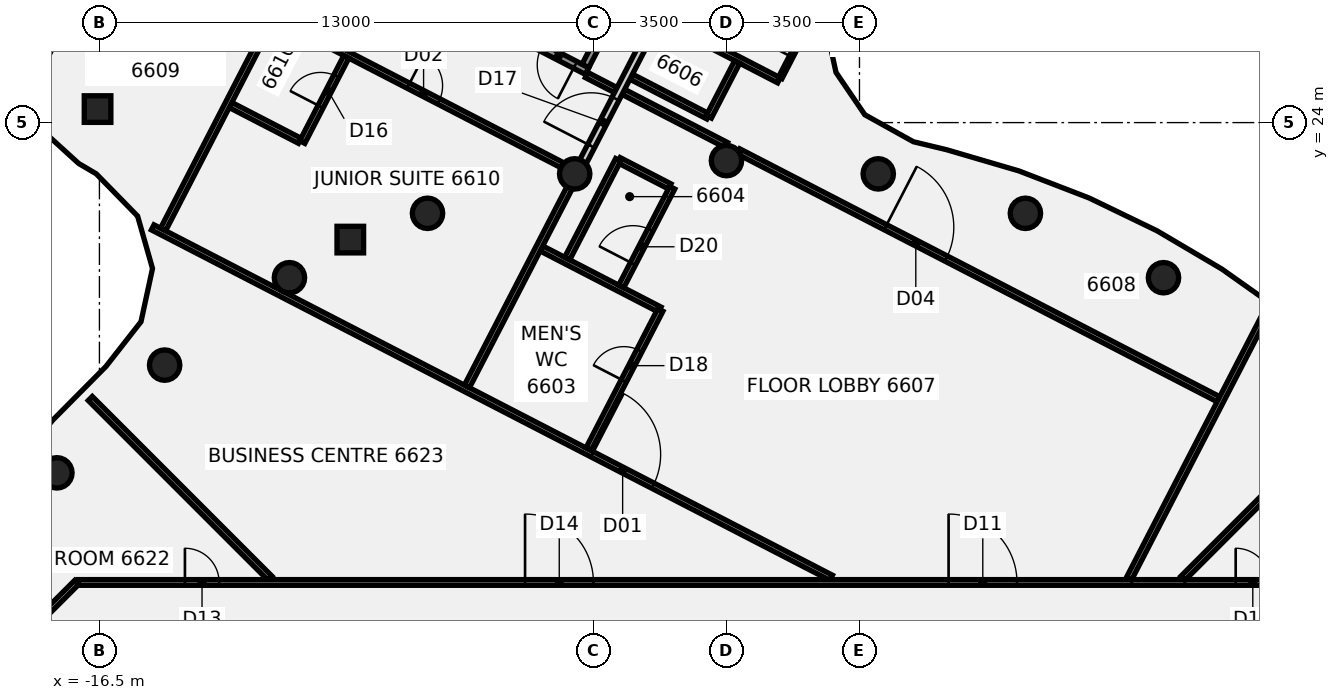
"""IFC4 building model, lengths in metres.
Left out: names, types, materials, properties, quantities, classifications, styles, units other than length and angle.
Written with IfcOpenShell. Run it as: python <this file> out.ifc"""

import sys

from ifc_helpers import new_model, si_unit, direction, frame, frame_2d, origin, origin_2d, place, context, subcontext, project, spatial, rectangle, circle, extrude, element, fill, save


model = new_model("IFC4")
c1 = context("Model", 3, precision=1e-05, world=origin(), true_north=direction((0.0, 1.0)))
c2 = subcontext(c1, "Body", "Model", "MODEL_VIEW")
j1 = project(units=[si_unit("LENGTHUNIT", "METRE"), si_unit("PLANEANGLEUNIT", "RADIAN")], contexts=[c1])
p1 = place(None, origin())
s1 = spatial("IfcSite", under=j1, at=p1, CompositionType="ELEMENT")
p2 = place(p1, origin())
s2 = spatial("IfcBuilding", under=s1, at=p2, CompositionType="ELEMENT")
p3 = place(p2, frame((0.0, 0.0, 260.4)))
s3 = spatial("IfcBuildingStorey", under=s2, at=p3, CompositionType="ELEMENT", Elevation=260.4)
for number, where, z_axis, x_axis in (
    (1, (11.5, 19.919, -0.14), (0.0, 0.0, 1.0), (1.0, 0.0, 0.0)),
    (2, (7.866, 21.613, -0.14), (0.0, 0.0, 1.0), (1.0, 0.0, 0.0)),
    (3, (3.994, 22.651, -0.14), (0.0, 0.0, 1.0), (1.0, 0.0, 0.0)),
    (4, (0.0, 23.0, -0.14), (0.0, 0.0, 1.0), (1.0, 0.0, 0.0)),
    (5, (-3.994, 22.651, -0.14), (0.0, 0.0, 1.0), (1.0, 0.0, 0.0)),
    (6, (-7.866, 21.613, -0.14), (0.0, 0.0, 1.0), (1.0, 0.0, 0.0)),
    (7, (-11.5, 19.919, -0.14), (0.0, 0.0, 1.0), (1.0, 0.0, 0.0)),
    (8, (-14.784, 17.619, -0.14), (0.0, 0.0, 1.0), (1.0, 0.0, 0.0)),
    (9, (-17.619, 14.784, -0.14), (0.0, 0.0, 1.0), (1.0, 0.0, 0.0)),
):
    element("IfcColumn", number, at=place(p3, frame(where, z_axis=z_axis, x_axis=x_axis)), inside=s3, PredefinedType="COLUMN", context=c2, shape_type="SweptSolid", body=[
        extrude(circle(Radius=0.4, at=origin_2d()), origin(), (0.0, 0.0, 1.0), 3.6),
    ])
p4 = place(p3, frame((-9.898, 20.921, -0.139), z_axis=(0.005896416244, -0.050017875725, 0.998730916906), x_axis=(0.459230429043, 0.887336577065, 0.041727832963)))
e10 = element("IfcColumn", 10, at=p4, inside=s3, PredefinedType="COLUMN", context=c2, shape_type="SweptSolid", body=[
    extrude(rectangle(XDim=0.7, YDim=0.7, at=origin_2d()), origin(), (0.0, 0.0, 1.0), 3.602),
])
p5 = place(p3, frame((-16.549, 24.356, -0.138), z_axis=(0.082069355489, -0.128908611525, 0.988254618388), x_axis=(0.462174840487, 0.883451999176, 0.076856892816)))
e11 = element("IfcColumn", 11, at=p5, inside=s3, PredefinedType="COLUMN", context=c2, shape_type="SweptSolid", body=[
    extrude(rectangle(XDim=0.7, YDim=0.7, at=origin_2d()), origin(), (0.0, 0.0, 1.0), 3.638),
])
p6 = place(p3, frame((-16.74, 16.74, 0.0), z_axis=(0.0, 0.0, 1.0), x_axis=(0.707106781187, -0.707106781187, 0.0)))
e12 = element("IfcWall", 12, at=p6, inside=s3, PredefinedType="PARTITIONING", context=c2, shape_type="SweptSolid", body=[
    extrude(rectangle(XDim=6.691, YDim=0.15, at=frame_2d((3.345, 0.0))), origin(), (0.0, 0.0, 1.0), 2.864),
])
p7 = place(p3, frame((-15.098, 21.244, 0.0), z_axis=(0.0, 0.0, 1.0), x_axis=(0.888519040902, -0.458839747575, 0.0)))
e13 = element("IfcWall", 13, at=p7, inside=s3, PredefinedType="PARTITIONING", context=c2, shape_type="SweptSolid", body=[
    extrude(rectangle(XDim=20.094, YDim=0.15, at=frame_2d((10.047, 0.0))), origin(), (0.0, 0.0, 1.0), 2.864),
])
p8 = place(p7, frame((13.018, 0.0, 0.0)))
e14 = element("IfcOpeningElement", 14, at=p8, cuts=e13, PredefinedType="OPENING", context=c2, shape_type="SweptSolid", body=[
    extrude(rectangle(XDim=1.8, YDim=2.1, at=frame_2d((0.9, 1.05))), frame((0.0, 0.085, 0.0), z_axis=(0.0, -1.0, 0.0), x_axis=(1.0, 0.0, 0.0)), (0.0, 0.0, 1.0), 0.17),
])
p9 = place(p3, frame((-13.05, 24.463, 0.0), z_axis=(0.0, 0.0, 1.0), x_axis=(0.888443709426, -0.458985593653, 0.0)))
e15 = element("IfcWall", 15, at=p9, inside=s3, PredefinedType="PARTITIONING", context=c2, shape_type="SweptSolid", body=[
    extrude(rectangle(XDim=2.051, YDim=0.15, at=frame_2d((1.025, 0.0))), origin(), (0.0, 0.0, 1.0), 2.864),
])
p10 = place(p3, frame((-11.857, 26.773, 0.0), z_axis=(0.0, 0.0, 1.0), x_axis=(0.888435104215, -0.459002250102, 0.0)))
e16 = element("IfcWall", 16, at=p10, inside=s3, PredefinedType="PARTITIONING", context=c2, shape_type="SweptSolid", body=[
    extrude(rectangle(XDim=8.479, YDim=0.15, at=frame_2d((4.24, 0.0))), origin(), (0.0, 0.0, 1.0), 2.864),
])
p11 = place(p10, frame((3.926, 0.0, 0.0)))
e17 = element("IfcOpeningElement", 17, at=p11, cuts=e16, PredefinedType="OPENING", context=c2, shape_type="SweptSolid", body=[
    extrude(rectangle(XDim=0.9, YDim=2.1, at=frame_2d((0.45, 1.05))), frame((0.0, 0.085, 0.0), z_axis=(0.0, -1.0, 0.0), x_axis=(1.0, 0.0, 0.0)), (0.0, 0.0, 1.0), 0.17),
])
p12 = place(p3, frame((-3.679, 25.25, 0.0), z_axis=(0.0, 0.0, 1.0), x_axis=(0.888616923334, -0.458650153782, 0.0)))
e18 = element("IfcWall", 18, at=p12, inside=s3, PredefinedType="PARTITIONING", context=c2, shape_type="SweptSolid", body=[
    extrude(rectangle(XDim=0.86, YDim=0.15, at=frame_2d((0.43, 0.0))), origin(), (0.0, 0.0, 1.0), 2.864),
])
p13 = place(p3, frame((-4.869, 20.689, 0.0), z_axis=(0.0, 0.0, 1.0), x_axis=(0.888427327324, -0.459017302575, 0.0)))
e19 = element("IfcWall", 19, at=p13, inside=s3, PredefinedType="PARTITIONING", context=c2, shape_type="SweptSolid", body=[
    extrude(rectangle(XDim=3.505, YDim=0.15, at=frame_2d((1.752, 0.0))), origin(), (0.0, 0.0, 1.0), 2.864),
])
p14 = place(p3, frame((-2.831, 23.012, 0.0), z_axis=(0.0, 0.0, 1.0), x_axis=(0.888612127858, -0.458659444713, 0.0)))
e20 = element("IfcWall", 20, at=p14, inside=s3, PredefinedType="PARTITIONING", context=c2, shape_type="SweptSolid", body=[
    extrude(rectangle(XDim=1.505, YDim=0.15, at=frame_2d((0.753, 0.0))), origin(), (0.0, 0.0, 1.0), 2.864),
])
p15 = place(p3, frame((-2.71, 24.806, 0.0), z_axis=(0.0, 0.0, 1.0), x_axis=(0.888497288197, -0.458881868094, 0.0)))
e21 = element("IfcWall", 21, at=p15, inside=s3, PredefinedType="PARTITIONING", context=c2, shape_type="SweptSolid", body=[
    extrude(rectangle(XDim=3.045, YDim=0.15, at=frame_2d((1.522, 0.0))), origin(), (0.0, 0.0, 1.0), 2.864),
])
p16 = place(p3, frame((0.317, 23.243, 0.0), z_axis=(0.0, 0.0, 1.0), x_axis=(0.888531890229, -0.458814864675, 0.0)))
e22 = element("IfcWall", 22, at=p16, inside=s3, PredefinedType="PARTITIONING", context=c2, shape_type="SweptSolid", body=[
    extrude(rectangle(XDim=14.213, YDim=0.15, at=frame_2d((7.106, 0.0))), origin(), (0.0, 0.0, 1.0), 2.864),
])
p17 = place(p16, frame((4.35, 0.0, 0.0)))
e23 = element("IfcOpeningElement", 23, at=p17, cuts=e22, PredefinedType="OPENING", context=c2, shape_type="SweptSolid", body=[
    extrude(rectangle(XDim=1.8, YDim=2.1, at=frame_2d((0.9, 1.05))), frame((0.0, 0.085, 0.0), z_axis=(0.0, -1.0, 0.0), x_axis=(1.0, 0.0, 0.0)), (0.0, 0.0, 1.0), 0.17),
])
p18 = place(p3, frame((-2.503, 25.206, 0.0), z_axis=(0.0, 0.0, 1.0), x_axis=(0.888511975047, -0.458853429974, 0.0)))
e24 = element("IfcWall", 24, at=p18, inside=s3, PredefinedType="PARTITIONING", context=c2, shape_type="SweptSolid", body=[
    extrude(rectangle(XDim=2.275, YDim=0.15, at=frame_2d((1.137, 0.0))), origin(), (0.0, 0.0, 1.0), 2.864),
])
p19 = place(p3, frame((-1.723, 26.717, 0.0), z_axis=(0.0, 0.0, 1.0), x_axis=(0.888352291306, -0.459162505581, 0.0)))
e25 = element("IfcWall", 25, at=p19, inside=s3, PredefinedType="PARTITIONING", context=c2, shape_type="SweptSolid", body=[
    extrude(rectangle(XDim=3.494, YDim=0.15, at=frame_2d((1.747, 0.0))), origin(), (0.0, 0.0, 1.0), 2.864),
])
p20 = place(p19, frame((0.495, 0.0, 0.0)))
e26 = element("IfcOpeningElement", 26, at=p20, cuts=e25, PredefinedType="OPENING", context=c2, shape_type="SweptSolid", body=[
    extrude(rectangle(XDim=0.9, YDim=2.1, at=frame_2d((0.45, 1.05))), frame((0.0, 0.085, 0.0), z_axis=(0.0, -1.0, 0.0), x_axis=(1.0, 0.0, 0.0)), (0.0, 0.0, 1.0), 0.17),
])
p21 = place(p3, frame((-17.065, 11.9, 0.0), z_axis=(0.0, 0.0, 1.0), x_axis=(1.0, 0.0, 0.0)))
e27 = element("IfcWall", 27, at=p21, inside=s3, PredefinedType="PARTITIONING", context=c2, shape_type="SweptSolid", body=[
    extrude(rectangle(XDim=34.165, YDim=0.15, at=frame_2d((17.083, 0.0))), origin(), (0.0, 0.0, 1.0), 2.864),
])
p22 = place(p21, frame((22.91, 0.0, 0.0)))
e28 = element("IfcOpeningElement", 28, at=p22, cuts=e27, PredefinedType="OPENING", context=c2, shape_type="SweptSolid", body=[
    extrude(rectangle(XDim=1.8, YDim=2.1, at=frame_2d((0.9, 1.05))), frame((0.0, 0.085, 0.0), z_axis=(0.0, -1.0, 0.0), x_axis=(1.0, 0.0, 0.0)), (0.0, 0.0, 1.0), 0.17),
])
p23 = place(p21, frame((30.465, 0.0, 0.0)))
e29 = element("IfcOpeningElement", 29, at=p23, cuts=e27, PredefinedType="OPENING", context=c2, shape_type="SweptSolid", body=[
    extrude(rectangle(XDim=0.9, YDim=2.1, at=frame_2d((0.45, 1.05))), frame((0.0, 0.085, 0.0), z_axis=(0.0, -1.0, 0.0), x_axis=(1.0, 0.0, 0.0)), (0.0, 0.0, 1.0), 0.17),
])
p24 = place(p21, frame((2.815, 0.0, 0.0)))
e30 = element("IfcOpeningElement", 30, at=p24, cuts=e27, PredefinedType="OPENING", context=c2, shape_type="SweptSolid", body=[
    extrude(rectangle(XDim=0.9, YDim=2.1, at=frame_2d((0.45, 1.05))), frame((0.0, 0.085, 0.0), z_axis=(0.0, -1.0, 0.0), x_axis=(1.0, 0.0, 0.0)), (0.0, 0.0, 1.0), 0.17),
])
p25 = place(p21, frame((11.765, 0.0, 0.0)))
e31 = element("IfcOpeningElement", 31, at=p25, cuts=e27, PredefinedType="OPENING", context=c2, shape_type="SweptSolid", body=[
    extrude(rectangle(XDim=1.8, YDim=2.1, at=frame_2d((0.9, 1.05))), frame((0.0, 0.085, 0.0), z_axis=(0.0, -1.0, 0.0), x_axis=(1.0, 0.0, 0.0)), (0.0, 0.0, 1.0), 0.17),
])
p26 = place(p3, frame((-18.886, 10.114, 0.0), z_axis=(0.0, 0.0, 1.0), x_axis=(0.707106781187, 0.707106781187, 0.0)))
e32 = element("IfcWall", 32, at=p26, inside=s3, PredefinedType="PARTITIONING", context=c2, shape_type="SweptSolid", body=[
    extrude(rectangle(XDim=2.526, YDim=0.15, at=frame_2d((1.263, 0.0))), origin(), (0.0, 0.0, 1.0), 2.864),
])
p27 = place(p3, frame((12.01, 12.01, 0.0), z_axis=(0.0, 0.0, 1.0), x_axis=(0.707106781187, 0.707106781187, 0.0)))
e33 = element("IfcWall", 33, at=p27, inside=s3, PredefinedType="PARTITIONING", context=c2, shape_type="SweptSolid", body=[
    extrude(rectangle(XDim=6.691, YDim=0.15, at=frame_2d((3.345, 0.0))), origin(), (0.0, 0.0, 1.0), 2.864),
])
p28 = place(p3, frame((-14.823, 21.191, 0.0), z_axis=(0.0, 0.0, 1.0), x_axis=(0.458646418676, 0.888618851159, 0.0)))
e34 = element("IfcWall", 34, at=p28, inside=s3, PredefinedType="PARTITIONING", context=c2, shape_type="SweptSolid", body=[
    extrude(rectangle(XDim=14.219, YDim=0.15, at=frame_2d((7.109, 0.0))), origin(), (0.0, 0.0, 1.0), 2.864),
])
p29 = place(p28, frame((6.77, 0.0, 0.0)))
e35 = element("IfcOpeningElement", 35, at=p29, cuts=e34, PredefinedType="OPENING", context=c2, shape_type="SweptSolid", body=[
    extrude(rectangle(XDim=1.8, YDim=2.1, at=frame_2d((0.9, 1.05))), frame((0.0, 0.085, 0.0), z_axis=(0.0, -1.0, 0.0), x_axis=(1.0, 0.0, 0.0)), (0.0, 0.0, 1.0), 0.17),
])
p30 = place(p3, frame((-11.162, 23.487, 0.0), z_axis=(0.0, 0.0, 1.0), x_axis=(0.458894122505, 0.88849095906, 0.0)))
e36 = element("IfcWall", 36, at=p30, inside=s3, PredefinedType="PARTITIONING", context=c2, shape_type="SweptSolid", body=[
    extrude(rectangle(XDim=2.525, YDim=0.15, at=frame_2d((1.262, 0.0))), origin(), (0.0, 0.0, 1.0), 2.864),
])
p31 = place(p30, frame((1.05, 0.0, 0.0)))
e37 = element("IfcOpeningElement", 37, at=p31, cuts=e36, PredefinedType="OPENING", context=c2, shape_type="SweptSolid", body=[
    extrude(rectangle(XDim=0.9, YDim=2.1, at=frame_2d((0.45, 1.05))), frame((0.0, 0.085, 0.0), z_axis=(0.0, -1.0, 0.0), x_axis=(1.0, 0.0, 0.0)), (0.0, 0.0, 1.0), 0.17),
])
p32 = place(p3, frame((-6.827, 17.062, 0.0), z_axis=(0.0, 0.0, 1.0), x_axis=(0.459003045801, 0.888434693123, 0.0)))
e38 = element("IfcWall", 38, at=p32, inside=s3, PredefinedType="PARTITIONING", context=c2, shape_type="SweptSolid", body=[
    extrude(rectangle(XDim=6.043, YDim=0.15, at=frame_2d((3.022, 0.0))), origin(), (0.0, 0.0, 1.0), 2.864),
])
p33 = place(p3, frame((-3.847, 22.831, 0.0), z_axis=(0.0, 0.0, 1.0), x_axis=(0.458980973869, 0.888446096072, 0.0)))
e39 = element("IfcWall", 39, at=p33, inside=s3, PredefinedType="PARTITIONING", context=c2, shape_type="SweptSolid", body=[
    extrude(rectangle(XDim=7.726, YDim=0.2, at=frame_2d((3.863, 0.0))), origin(), (0.0, 0.0, 1.0), 2.864),
])
p34 = place(p33, frame((0.623, 0.0, 0.0)))
e40 = element("IfcOpeningElement", 40, at=p34, cuts=e39, PredefinedType="OPENING", context=c2, shape_type="SweptSolid", body=[
    extrude(rectangle(XDim=1.4, YDim=2.1, at=frame_2d((0.7, 1.05))), frame((0.0, 0.11, 0.0), z_axis=(0.0, -1.0, 0.0), x_axis=(1.0, 0.0, 0.0)), (0.0, 0.0, 1.0), 0.22),
])
p35 = place(p3, frame((-4.191, 20.423, 0.0), z_axis=(0.0, 0.0, 1.0), x_axis=(0.458764133675, 0.888558084569, 0.0)))
e41 = element("IfcWall", 41, at=p35, inside=s3, PredefinedType="PARTITIONING", context=c2, shape_type="SweptSolid", body=[
    extrude(rectangle(XDim=2.924, YDim=0.15, at=frame_2d((1.462, 0.0))), origin(), (0.0, 0.0, 1.0), 2.864),
])
p36 = place(p3, frame((-3.628, 15.41, 0.0), z_axis=(0.0, 0.0, 1.0), x_axis=(0.458813471037, 0.888532609866, 0.0)))
e42 = element("IfcWall", 42, at=p36, inside=s3, PredefinedType="PARTITIONING", context=c2, shape_type="SweptSolid", body=[
    extrude(rectangle(XDim=4.12, YDim=0.15, at=frame_2d((2.06, 0.0))), origin(), (0.0, 0.0, 1.0), 2.864),
])
p37 = place(p36, frame((2.02, 0.0, 0.0)))
e43 = element("IfcOpeningElement", 43, at=p37, cuts=e42, PredefinedType="OPENING", context=c2, shape_type="SweptSolid", body=[
    extrude(rectangle(XDim=0.9, YDim=2.1, at=frame_2d((0.45, 1.05))), frame((0.0, 0.085, 0.0), z_axis=(0.0, -1.0, 0.0), x_axis=(1.0, 0.0, 0.0)), (0.0, 0.0, 1.0), 0.17),
])
p38 = place(p3, frame((1.416, 25.18, 0.0), z_axis=(0.0, 0.0, 1.0), x_axis=(0.458747305615, 0.888566772725, 0.0)))
e44 = element("IfcWall", 44, at=p38, inside=s3, PredefinedType="PARTITIONING", context=c2, shape_type="SweptSolid", body=[
    extrude(rectangle(XDim=2.026, YDim=0.1, at=frame_2d((1.013, 0.0))), origin(), (0.0, 0.0, 1.0), 2.864),
])
p39 = place(p38, frame((0.625, 0.0, 0.0)))
e45 = element("IfcOpeningElement", 45, at=p39, cuts=e44, PredefinedType="OPENING", context=c2, shape_type="SweptSolid", body=[
    extrude(rectangle(XDim=0.9, YDim=2.1, at=frame_2d((0.45, 1.05))), frame((0.0, 0.06, 0.0), z_axis=(0.0, -1.0, 0.0), x_axis=(1.0, 0.0, 0.0)), (0.0, 0.0, 1.0), 0.12),
])
p40 = place(p3, frame((-2.77, 19.689, 0.0), z_axis=(0.0, 0.0, 1.0), x_axis=(0.459027738639, 0.888421935321, 0.0)))
e46 = element("IfcWall", 46, at=p40, inside=s3, PredefinedType="PARTITIONING", context=c2, shape_type="SweptSolid", body=[
    extrude(rectangle(XDim=2.925, YDim=0.15, at=frame_2d((1.462, 0.0))), origin(), (0.0, 0.0, 1.0), 2.864),
])
p41 = place(p40, frame((0.675, 0.0, 0.0)))
e47 = element("IfcOpeningElement", 47, at=p41, cuts=e46, PredefinedType="OPENING", context=c2, shape_type="SweptSolid", body=[
    extrude(rectangle(XDim=1.0, YDim=2.1, at=frame_2d((0.5, 1.05))), frame((0.0, 0.085, 0.0), z_axis=(0.0, -1.0, 0.0), x_axis=(1.0, 0.0, 0.0)), (0.0, 0.0, 1.0), 0.17),
])
p42 = place(p3, frame((-0.463, 24.153, 0.0), z_axis=(0.0, 0.0, 1.0), x_axis=(0.459136695029, 0.888365631527, 0.0)))
e48 = element("IfcWall", 48, at=p42, inside=s3, PredefinedType="PARTITIONING", context=c2, shape_type="SweptSolid", body=[
    extrude(rectangle(XDim=1.625, YDim=0.15, at=frame_2d((0.812, 0.0))), origin(), (0.0, 0.0, 1.0), 2.864),
])
p43 = place(p3, frame((10.589, 11.993, 0.0), z_axis=(0.0, 0.0, 1.0), x_axis=(0.458841921055, 0.888517918493, 0.0)))
e49 = element("IfcWall", 49, at=p43, inside=s3, PredefinedType="PARTITIONING", context=c2, shape_type="SweptSolid", body=[
    extrude(rectangle(XDim=7.844, YDim=0.15, at=frame_2d((3.922, 0.0))), origin(), (0.0, 0.0, 1.0), 2.864),
])
p44 = place(p3, frame((-3.668, 25.357, -0.14), z_axis=(0.0, 0.0, 1.0), x_axis=(-0.888520991089, 0.45883597112, 0.0)))
e50 = element("IfcWall", 50, at=p44, inside=s3, PredefinedType="SHEAR", context=c2, shape_type="SweptSolid", body=[
    extrude(rectangle(XDim=6.7, YDim=0.2, at=frame_2d((3.35, 0.0))), origin(), (0.0, 0.0, 1.0), 3.154),
])
p45 = place(p44, frame((0.35, 0.0, 0.0)))
e51 = element("IfcOpeningElement", 51, at=p45, cuts=e50, PredefinedType="OPENING", context=c2, shape_type="SweptSolid", body=[
    extrude(rectangle(XDim=1.0, YDim=2.1, at=frame_2d((0.5, 1.05))), frame((0.0, 0.11, 0.0), z_axis=(0.0, -1.0, 0.0), x_axis=(1.0, 0.0, 0.0)), (0.0, 0.0, 1.0), 0.22),
])
p46 = place(p3, frame((-2.243, 28.335, -0.14), z_axis=(0.0, 0.0, 1.0), x_axis=(-0.458833362648, -0.88852233811, 0.0)))
e52 = element("IfcWall", 52, at=p46, inside=s3, PredefinedType="SHEAR", context=c2, shape_type="SweptSolid", body=[
    extrude(rectangle(XDim=3.2, YDim=0.2, at=frame_2d((1.6, 0.0))), origin(), (0.0, 0.0, 1.0), 3.6),
])
p47 = place(p8, origin())
e53 = element("IfcDoor", 53, at=p47, inside=s3, OperationType="DOUBLE_DOOR_SINGLE_SWING", PredefinedType="DOOR", context=c2, shape_type="SweptSolid", body=[
    extrude(rectangle(XDim=1.8, YDim=2.1, at=frame_2d((0.9, 1.05))), frame((0.0, 0.025, 0.0), z_axis=(0.0, -1.0, 0.0), x_axis=(1.0, 0.0, 0.0)), (0.0, 0.0, 1.0), 0.05),
])
fill(e14, e53)
p48 = place(p11, frame((0.9, 0.0, 0.0), z_axis=(0.0, 0.0, 1.0), x_axis=(-1.0, 0.0, 0.0)))
e54 = element("IfcDoor", 54, at=p48, inside=s3, OperationType="SINGLE_SWING_RIGHT", PredefinedType="DOOR", context=c2, shape_type="SweptSolid", body=[
    extrude(rectangle(XDim=0.9, YDim=2.1, at=frame_2d((0.45, 1.05))), frame((0.0, 0.025, 0.0), z_axis=(0.0, -1.0, 0.0), x_axis=(1.0, 0.0, 0.0)), (0.0, 0.0, 1.0), 0.05),
])
fill(e17, e54)
p49 = place(p17, origin())
e55 = element("IfcDoor", 55, at=p49, inside=s3, OperationType="DOUBLE_DOOR_SINGLE_SWING", PredefinedType="DOOR", context=c2, shape_type="SweptSolid", body=[
    extrude(rectangle(XDim=1.8, YDim=2.1, at=frame_2d((0.9, 1.05))), frame((0.0, 0.025, 0.0), z_axis=(0.0, -1.0, 0.0), x_axis=(1.0, 0.0, 0.0)), (0.0, 0.0, 1.0), 0.05),
])
fill(e23, e55)
p50 = place(p22, frame((1.8, 0.0, 0.0), z_axis=(0.0, 0.0, 1.0), x_axis=(-1.0, 0.0, 0.0)))
e56 = element("IfcDoor", 56, at=p50, inside=s3, OperationType="DOUBLE_DOOR_SINGLE_SWING", PredefinedType="DOOR", context=c2, shape_type="SweptSolid", body=[
    extrude(rectangle(XDim=1.8, YDim=2.1, at=frame_2d((0.9, 1.05))), frame((0.0, 0.025, 0.0), z_axis=(0.0, -1.0, 0.0), x_axis=(1.0, 0.0, 0.0)), (0.0, 0.0, 1.0), 0.05),
])
fill(e28, e56)
p51 = place(p23, origin())
e57 = element("IfcDoor", 57, at=p51, inside=s3, OperationType="SINGLE_SWING_LEFT", PredefinedType="DOOR", context=c2, shape_type="SweptSolid", body=[
    extrude(rectangle(XDim=0.9, YDim=2.1, at=frame_2d((0.45, 1.05))), frame((0.0, 0.025, 0.0), z_axis=(0.0, -1.0, 0.0), x_axis=(1.0, 0.0, 0.0)), (0.0, 0.0, 1.0), 0.05),
])
fill(e29, e57)
p52 = place(p24, origin())
e58 = element("IfcDoor", 58, at=p52, inside=s3, OperationType="SINGLE_SWING_RIGHT", PredefinedType="DOOR", context=c2, shape_type="SweptSolid", body=[
    extrude(rectangle(XDim=0.9, YDim=2.1, at=frame_2d((0.45, 1.05))), frame((0.0, 0.025, 0.0), z_axis=(0.0, -1.0, 0.0), x_axis=(1.0, 0.0, 0.0)), (0.0, 0.0, 1.0), 0.05),
])
fill(e30, e58)
p53 = place(p25, frame((1.8, 0.0, 0.0), z_axis=(0.0, 0.0, 1.0), x_axis=(-1.0, 0.0, 0.0)))
e59 = element("IfcDoor", 59, at=p53, inside=s3, OperationType="DOUBLE_DOOR_SINGLE_SWING", PredefinedType="DOOR", context=c2, shape_type="SweptSolid", body=[
    extrude(rectangle(XDim=1.8, YDim=2.1, at=frame_2d((0.9, 1.05))), frame((0.0, 0.025, 0.0), z_axis=(0.0, -1.0, 0.0), x_axis=(1.0, 0.0, 0.0)), (0.0, 0.0, 1.0), 0.05),
])
fill(e31, e59)
p54 = place(p31, origin())
e60 = element("IfcDoor", 60, at=p54, inside=s3, OperationType="SINGLE_SWING_LEFT", PredefinedType="DOOR", context=c2, shape_type="SweptSolid", body=[
    extrude(rectangle(XDim=0.9, YDim=2.1, at=frame_2d((0.45, 1.05))), frame((0.0, 0.025, 0.0), z_axis=(0.0, -1.0, 0.0), x_axis=(1.0, 0.0, 0.0)), (0.0, 0.0, 1.0), 0.05),
])
fill(e37, e60)
p55 = place(p34, frame((1.4, 0.0, 0.0), z_axis=(0.0, 0.0, 1.0), x_axis=(-1.0, 0.0, 0.0)))
e61 = element("IfcDoor", 61, at=p55, inside=s3, OperationType="DOUBLE_DOOR_SINGLE_SWING", PredefinedType="DOOR", context=c2, shape_type="SweptSolid", body=[
    extrude(rectangle(XDim=1.4, YDim=2.1, at=frame_2d((0.7, 1.05))), frame((0.0, 0.025, 0.0), z_axis=(0.0, -1.0, 0.0), x_axis=(1.0, 0.0, 0.0)), (0.0, 0.0, 1.0), 0.05),
])
fill(e40, e61)
p56 = place(p37, origin())
e62 = element("IfcDoor", 62, at=p56, inside=s3, OperationType="SINGLE_SWING_LEFT", PredefinedType="DOOR", context=c2, shape_type="SweptSolid", body=[
    extrude(rectangle(XDim=0.9, YDim=2.1, at=frame_2d((0.45, 1.05))), frame((0.0, 0.025, 0.0), z_axis=(0.0, -1.0, 0.0), x_axis=(1.0, 0.0, 0.0)), (0.0, 0.0, 1.0), 0.05),
])
fill(e43, e62)
p57 = place(p39, origin())
e63 = element("IfcDoor", 63, at=p57, inside=s3, OperationType="SINGLE_SWING_LEFT", PredefinedType="DOOR", context=c2, shape_type="SweptSolid", body=[
    extrude(rectangle(XDim=0.9, YDim=2.1, at=frame_2d((0.45, 1.05))), frame((0.0, 0.025, 0.0), z_axis=(0.0, -1.0, 0.0), x_axis=(1.0, 0.0, 0.0)), (0.0, 0.0, 1.0), 0.05),
])
fill(e45, e63)
p58 = place(p41, origin())
e64 = element("IfcDoor", 64, at=p58, inside=s3, OperationType="SINGLE_SWING_RIGHT", PredefinedType="DOOR", context=c2, shape_type="SweptSolid", body=[
    extrude(rectangle(XDim=1.0, YDim=2.1, at=frame_2d((0.5, 1.05))), frame((0.0, 0.025, 0.0), z_axis=(0.0, -1.0, 0.0), x_axis=(1.0, 0.0, 0.0)), (0.0, 0.0, 1.0), 0.05),
])
fill(e47, e64)
p59 = place(p45, origin())
e65 = element("IfcDoor", 65, at=p59, inside=s3, OperationType="SINGLE_SWING_LEFT", PredefinedType="DOOR", context=c2, shape_type="SweptSolid", body=[
    extrude(rectangle(XDim=1.0, YDim=2.1, at=frame_2d((0.5, 1.05))), frame((0.0, 0.025, 0.0), z_axis=(0.0, -1.0, 0.0), x_axis=(1.0, 0.0, 0.0)), (0.0, 0.0, 1.0), 0.05),
])
fill(e51, e65)
save(model, sys.argv[1])
